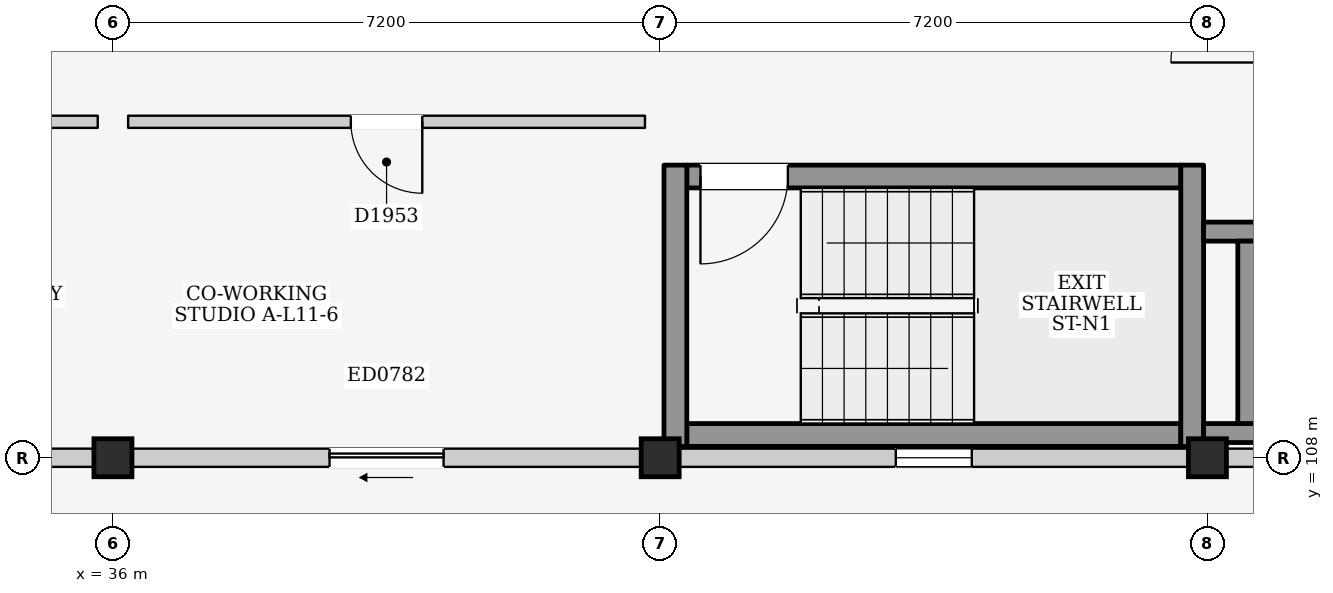
"""IFC4 building model, lengths in metres.
Left out: names, types, materials, properties, quantities, classifications, styles, units other than length and angle.
Written with IfcOpenShell. Run it as: python <this file> out.ifc"""

import sys

from ifc_helpers import new_model, si_unit, direction, frame, frame_2d, origin, origin_2d, place, context, subcontext, project, spatial, rectangle, extrude, element, fill, save


model = new_model("IFC4")
c1 = context("Model", 3, precision=1e-05, world=origin(), true_north=direction((0.0, 1.0)))
c2 = subcontext(c1, "Body", "Model", "MODEL_VIEW")
j1 = project(units=[si_unit("LENGTHUNIT", "METRE"), si_unit("PLANEANGLEUNIT", "RADIAN")], contexts=[c1])
p1 = place(None, origin())
s1 = spatial("IfcSite", under=j1, at=p1, CompositionType="ELEMENT")
p2 = place(p1, origin())
s2 = spatial("IfcBuilding", under=s1, at=p2, CompositionType="ELEMENT")
p3 = place(p2, frame((0.0, 0.0, 38.0)))
s3 = spatial("IfcBuildingStorey", under=s2, at=p3, CompositionType="ELEMENT", Elevation=38.0)
for number, where, z_axis, x_axis in (
    (1, (36.0, 108.0, 0.0), (0.0, 0.0, 1.0), (1.0, 0.0, 0.0)),
    (2, (43.2, 108.0, 0.0), (0.0, 0.0, 1.0), (1.0, 0.0, 0.0)),
    (3, (50.4, 108.0, 0.0), (0.0, 0.0, 1.0), (1.0, 0.0, 0.0)),
):
    element("IfcColumn", number, at=place(p3, frame(where, z_axis=z_axis, x_axis=x_axis)), inside=s3, PredefinedType="COLUMN", context=c2, shape_type="SweptSolid", body=[
        extrude(rectangle(XDim=0.5, YDim=0.5, at=origin_2d()), origin(), (0.0, 0.0, 1.0), 3.2),
    ])
p4 = place(p3, frame((29.05, 108.0, 0.0), z_axis=(0.0, 0.0, 1.0), x_axis=(1.0, 0.0, 0.0)))
e4 = element("IfcWall", 4, at=p4, inside=s3, PredefinedType="ELEMENTEDWALL", context=c2, shape_type="SweptSolid", body=[
    extrude(rectangle(XDim=6.7, YDim=0.24, at=frame_2d((3.35, 0.0))), origin(), (0.0, 0.0, 1.0), 2.325),
])
p5 = place(p4, frame((2.6, 0.0, 0.0)))
e5 = element("IfcOpeningElement", 5, at=p5, cuts=e4, PredefinedType="OPENING", context=c2, shape_type="SweptSolid", body=[
    extrude(rectangle(XDim=1.5, YDim=2.12, at=frame_2d((0.75, 1.06))), frame((0.0, 0.135, 0.0), z_axis=(0.0, -1.0, 0.0), x_axis=(1.0, 0.0, 0.0)), (0.0, 0.0, 1.0), 0.27),
])
p6 = place(p3, frame((36.25, 108.0, 0.0), z_axis=(0.0, 0.0, 1.0), x_axis=(1.0, 0.0, 0.0)))
e6 = element("IfcWall", 6, at=p6, inside=s3, PredefinedType="ELEMENTEDWALL", context=c2, shape_type="SweptSolid", body=[
    extrude(rectangle(XDim=6.7, YDim=0.24, at=frame_2d((3.35, 0.0))), origin(), (0.0, 0.0, 1.0), 2.325),
])
p7 = place(p6, frame((2.6, 0.0, 0.0)))
e7 = element("IfcOpeningElement", 7, at=p7, cuts=e6, PredefinedType="OPENING", context=c2, shape_type="SweptSolid", body=[
    extrude(rectangle(XDim=1.5, YDim=2.12, at=frame_2d((0.75, 1.06))), frame((0.0, 0.135, 0.0), z_axis=(0.0, -1.0, 0.0), x_axis=(1.0, 0.0, 0.0)), (0.0, 0.0, 1.0), 0.27),
])
p8 = place(p3, frame((43.45, 108.0, 0.0), z_axis=(0.0, 0.0, 1.0), x_axis=(1.0, 0.0, 0.0)))
e8 = element("IfcWall", 8, at=p8, inside=s3, PredefinedType="ELEMENTEDWALL", context=c2, shape_type="SweptSolid", body=[
    extrude(rectangle(XDim=6.7, YDim=0.24, at=frame_2d((3.35, 0.0))), origin(), (0.0, 0.0, 1.0), 2.325),
])
p9 = place(p8, frame((2.85, 0.0, 1.2)))
e9 = element("IfcOpeningElement", 9, at=p9, cuts=e8, PredefinedType="OPENING", context=c2, shape_type="SweptSolid", body=[
    extrude(rectangle(XDim=1.0, YDim=0.9, at=frame_2d((0.5, 0.45))), frame((0.0, 0.135, 0.0), z_axis=(0.0, -1.0, 0.0), x_axis=(1.0, 0.0, 0.0)), (0.0, 0.0, 1.0), 0.27),
])
p10 = place(p3, frame((50.65, 108.0, 0.0), z_axis=(0.0, 0.0, 1.0), x_axis=(1.0, 0.0, 0.0)))
e10 = element("IfcWall", 10, at=p10, inside=s3, PredefinedType="ELEMENTEDWALL", context=c2, shape_type="SweptSolid", body=[
    extrude(rectangle(XDim=6.7, YDim=0.24, at=frame_2d((3.35, 0.0))), origin(), (0.0, 0.0, 1.0), 2.325),
])
p11 = place(p10, frame((2.85, 0.0, 1.2)))
e11 = element("IfcOpeningElement", 11, at=p11, cuts=e10, PredefinedType="OPENING", context=c2, shape_type="SweptSolid", body=[
    extrude(rectangle(XDim=1.0, YDim=0.9, at=frame_2d((0.5, 0.45))), frame((0.0, 0.135, 0.0), z_axis=(0.0, -1.0, 0.0), x_axis=(1.0, 0.0, 0.0)), (0.0, 0.0, 1.0), 0.27),
])
p12 = place(p3, frame((43.55, 108.3, 0.0), z_axis=(0.0, 0.0, 1.0), x_axis=(1.0, 0.0, 0.0)))
e12 = element("IfcWall", 12, at=p12, inside=s3, PredefinedType="SHEAR", context=c2, shape_type="SweptSolid", body=[
    extrude(rectangle(XDim=6.5, YDim=0.3, at=frame_2d((3.25, 0.0))), origin(), (0.0, 0.0, 1.0), 2.99),
])
p13 = place(p3, frame((43.55, 111.7, 0.0), z_axis=(0.0, 0.0, 1.0), x_axis=(1.0, 0.0, 0.0)))
e13 = element("IfcWall", 13, at=p13, inside=s3, PredefinedType="SHEAR", context=c2, shape_type="SweptSolid", body=[
    extrude(rectangle(XDim=6.5, YDim=0.3, at=frame_2d((3.25, 0.0))), origin(), (0.0, 0.0, 1.0), 2.99),
])
p14 = place(p13, frame((0.18, 0.0, 0.0)))
e14 = element("IfcOpeningElement", 14, at=p14, cuts=e13, PredefinedType="OPENING", context=c2, shape_type="SweptSolid", body=[
    extrude(rectangle(XDim=1.15, YDim=2.2, at=frame_2d((0.575, 1.1))), frame((0.0, 0.165, 0.0), z_axis=(0.0, -1.0, 0.0), x_axis=(1.0, 0.0, 0.0)), (0.0, 0.0, 1.0), 0.33),
])
for number, where, z_axis, x_axis in (
    (15, (43.4, 108.15, 0.0), (0.0, 0.0, 1.0), (0.0, 1.0, 0.0)),
    (16, (50.2, 108.15, 0.0), (0.0, 0.0, 1.0), (0.0, 1.0, 0.0)),
):
    element("IfcWall", number, at=place(p3, frame(where, z_axis=z_axis, x_axis=x_axis)), inside=s3, PredefinedType="SHEAR", context=c2, shape_type="SweptSolid", body=[
        extrude(rectangle(XDim=3.7, YDim=0.3, at=frame_2d((1.85, 0.0))), origin(), (0.0, 0.0, 1.0), 2.99),
    ])
p15 = place(p3, frame((50.35, 108.325, 0.0), z_axis=(0.0, 0.0, 1.0), x_axis=(1.0, 0.0, 0.0)))
e17 = element("IfcWall", 17, at=p15, inside=s3, PredefinedType="SHEAR", context=c2, shape_type="SweptSolid", body=[
    extrude(rectangle(XDim=2.675, YDim=0.25, at=frame_2d((1.337, 0.0))), origin(), (0.0, 0.0, 1.0), 2.99),
])
p16 = place(p3, frame((50.35, 110.975, 0.0), z_axis=(0.0, 0.0, 1.0), x_axis=(1.0, 0.0, 0.0)))
e18 = element("IfcWall", 18, at=p16, inside=s3, PredefinedType="SHEAR", context=c2, shape_type="SweptSolid", body=[
    extrude(rectangle(XDim=2.675, YDim=0.25, at=frame_2d((1.337, 0.0))), origin(), (0.0, 0.0, 1.0), 2.99),
])
p17 = place(p16, frame((1.0, 0.0, 0.0)))
e19 = element("IfcOpeningElement", 19, at=p17, cuts=e18, PredefinedType="OPENING", context=c2, shape_type="SweptSolid", body=[
    extrude(rectangle(XDim=1.2, YDim=2.25, at=frame_2d((0.6, 1.125))), frame((0.0, 0.14, 0.0), z_axis=(0.0, -1.0, 0.0), x_axis=(1.0, 0.0, 0.0)), (0.0, 0.0, 1.0), 0.28),
])
p18 = place(p3, frame((50.925, 108.45, 0.0), z_axis=(0.0, 0.0, 1.0), x_axis=(0.0, 1.0, 0.0)))
e20 = element("IfcWall", 20, at=p18, inside=s3, PredefinedType="SHEAR", context=c2, shape_type="SweptSolid", body=[
    extrude(rectangle(XDim=2.4, YDim=0.25, at=frame_2d((1.2, 0.0))), origin(), (0.0, 0.0, 1.0), 2.99),
])
p19 = place(p3, frame((29.0, 112.42, 0.0), z_axis=(0.0, 0.0, 1.0), x_axis=(1.0, 0.0, 0.0)))
e21 = element("IfcWall", 21, at=p19, inside=s3, PredefinedType="PARTITIONING", context=c2, shape_type="SweptSolid", body=[
    extrude(rectangle(XDim=6.8, YDim=0.16, at=frame_2d((3.4, 0.0))), origin(), (0.0, 0.0, 1.0), 2.99),
])
p20 = place(p19, frame((2.93, 0.0, 0.0)))
e22 = element("IfcOpeningElement", 22, at=p20, cuts=e21, PredefinedType="OPENING", context=c2, shape_type="SweptSolid", body=[
    extrude(rectangle(XDim=0.94, YDim=2.12, at=frame_2d((0.47, 1.06))), frame((0.0, 0.095, 0.0), z_axis=(0.0, -1.0, 0.0), x_axis=(1.0, 0.0, 0.0)), (0.0, 0.0, 1.0), 0.19),
])
p21 = place(p3, frame((36.2, 112.42, 0.0), z_axis=(0.0, 0.0, 1.0), x_axis=(1.0, 0.0, 0.0)))
e23 = element("IfcWall", 23, at=p21, inside=s3, PredefinedType="PARTITIONING", context=c2, shape_type="SweptSolid", body=[
    extrude(rectangle(XDim=6.8, YDim=0.16, at=frame_2d((3.4, 0.0))), origin(), (0.0, 0.0, 1.0), 2.99),
])
p22 = place(p21, frame((2.93, 0.0, 0.0)))
e24 = element("IfcOpeningElement", 24, at=p22, cuts=e23, PredefinedType="OPENING", context=c2, shape_type="SweptSolid", body=[
    extrude(rectangle(XDim=0.94, YDim=2.12, at=frame_2d((0.47, 1.06))), frame((0.0, 0.095, 0.0), z_axis=(0.0, -1.0, 0.0), x_axis=(1.0, 0.0, 0.0)), (0.0, 0.0, 1.0), 0.19),
])
p23 = place(p7, frame((1.5, 0.0, 0.0), z_axis=(0.0, 0.0, 1.0), x_axis=(-1.0, 0.0, 0.0)))
e25 = element("IfcDoor", 25, at=p23, inside=s3, OperationType="SLIDING_TO_LEFT", PredefinedType="DOOR", context=c2, shape_type="SweptSolid", body=[
    extrude(rectangle(XDim=1.5, YDim=2.12, at=frame_2d((0.75, 1.06))), frame((0.0, 0.025, 0.0), z_axis=(0.0, -1.0, 0.0), x_axis=(1.0, 0.0, 0.0)), (0.0, 0.0, 1.0), 0.05),
])
fill(e7, e25)
p24 = place(p9, origin())
e26 = element("IfcWindow", 26, at=p24, inside=s3, PartitioningType="SINGLE_PANEL", PredefinedType="WINDOW", context=c2, shape_type="SweptSolid", body=[
    extrude(rectangle(XDim=1.0, YDim=0.9, at=frame_2d((0.5, 0.45))), frame((0.0, 0.03, 0.0), z_axis=(0.0, -1.0, 0.0), x_axis=(1.0, 0.0, 0.0)), (0.0, 0.0, 1.0), 0.06),
])
fill(e9, e26)
p25 = place(p14, frame((1.15, 0.0, 0.0), z_axis=(0.0, 0.0, 1.0), x_axis=(-1.0, 0.0, 0.0)))
e27 = element("IfcDoor", 27, at=p25, inside=s3, OperationType="SINGLE_SWING_RIGHT", PredefinedType="DOOR", context=c2, shape_type="SweptSolid", body=[
    extrude(rectangle(XDim=1.15, YDim=2.2, at=frame_2d((0.575, 1.1))), frame((0.0, 0.025, 0.0), z_axis=(0.0, -1.0, 0.0), x_axis=(1.0, 0.0, 0.0)), (0.0, 0.0, 1.0), 0.05),
])
fill(e14, e27)
p26 = place(p22, frame((0.94, 0.0, 0.0), z_axis=(0.0, 0.0, 1.0), x_axis=(-1.0, 0.0, 0.0)))
e28 = element("IfcDoor", 28, at=p26, inside=s3, OperationType="SINGLE_SWING_LEFT", PredefinedType="DOOR", context=c2, shape_type="SweptSolid", body=[
    extrude(rectangle(XDim=0.94, YDim=2.12, at=frame_2d((0.47, 1.06))), frame((0.0, 0.025, 0.0), z_axis=(0.0, -1.0, 0.0), x_axis=(1.0, 0.0, 0.0)), (0.0, 0.0, 1.0), 0.05),
])
fill(e24, e28)
save(model, sys.argv[1])
